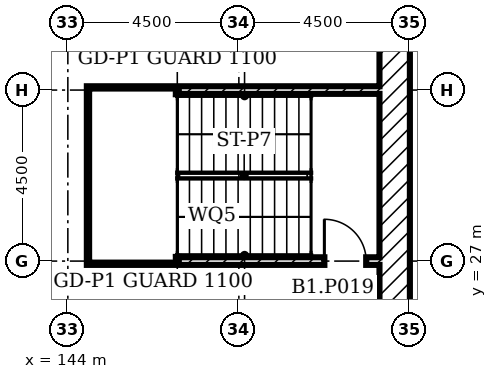
"""IFC4 building model, lengths in metres.
Left out: names, types, materials, properties, quantities, classifications, styles, units other than length and angle.
Written with IfcOpenShell. Run it as: python <this file> out.ifc"""

import sys

from ifc_helpers import new_model, si_unit, direction, frame, frame_2d, origin, place, context, subcontext, project, spatial, rectangle, extrude, element, fill, save


model = new_model("IFC4")
c1 = context("Model", 3, precision=1e-05, world=origin(), true_north=direction((0.0, 1.0)))
c2 = subcontext(c1, "Body", "Model", "MODEL_VIEW")
j1 = project(units=[si_unit("LENGTHUNIT", "METRE"), si_unit("PLANEANGLEUNIT", "RADIAN")], contexts=[c1])
p1 = place(None, origin())
s1 = spatial("IfcSite", under=j1, at=p1, CompositionType="ELEMENT")
p2 = place(p1, origin())
s2 = spatial("IfcBuilding", under=s1, at=p2, CompositionType="ELEMENT")
p3 = place(p2, frame((0.0, 0.0, -4.0)))
s3 = spatial("IfcBuildingStorey", under=s2, at=p3, CompositionType="ELEMENT", Elevation=-4.0)
p4 = place(p3, frame((152.6, 0.8, 0.0), z_axis=(0.0, 0.0, 1.0), x_axis=(0.0, 1.0, 0.0)))
e1 = element("IfcWall", 1, at=p4, inside=s3, PredefinedType="SOLIDWALL", context=c2, shape_type="SweptSolid", body=[
    extrude(rectangle(XDim=97.4, YDim=0.8, at=frame_2d((48.7, 0.0))), origin(), (0.0, 0.0, 1.0), 4.0),
])
p5 = place(p3, frame((144.6, 26.9, 0.0), z_axis=(0.0, 0.0, 1.0), x_axis=(0.0, 1.0, 0.0)))
e2 = element("IfcWall", 2, at=p5, inside=s3, PredefinedType="SOLIDWALL", context=c2, shape_type="SweptSolid", body=[
    extrude(rectangle(XDim=4.7, YDim=0.2, at=frame_2d((2.35, 0.0))), origin(), (0.0, 0.0, 1.0), 3.55),
])
p6 = place(p3, frame((144.7, 27.0, 0.0)))
e3 = element("IfcWall", 3, at=p6, inside=s3, PredefinedType="SOLIDWALL", context=c2, shape_type="SweptSolid", body=[
    extrude(rectangle(XDim=7.5, YDim=0.2, at=frame_2d((3.75, 0.0))), origin(), (0.0, 0.0, 1.0), 3.55),
])
p7 = place(p6, frame((6.05, 0.0, 0.0)))
e4 = element("IfcOpeningElement", 4, at=p7, cuts=e3, PredefinedType="OPENING", context=c2, shape_type="SweptSolid", body=[
    extrude(rectangle(XDim=1.1, YDim=2.1, at=frame_2d((0.55, 1.05))), frame((0.0, 0.11, 0.0), z_axis=(0.0, -1.0, 0.0), x_axis=(1.0, 0.0, 0.0)), (0.0, 0.0, 1.0), 0.22),
])
p8 = place(p3, frame((144.7, 31.5, 0.0)))
e5 = element("IfcWall", 5, at=p8, inside=s3, PredefinedType="SOLIDWALL", context=c2, shape_type="SweptSolid", body=[
    extrude(rectangle(XDim=7.5, YDim=0.2, at=frame_2d((3.75, 0.0))), origin(), (0.0, 0.0, 1.0), 3.55),
])
for number, where, z_axis, x_axis in (
    (6, (146.78, 27.1, -2.0), (0.0, 0.0, 1.0), (0.0, 1.0, 0.0)),
    (7, (145.3, 27.1, -2.0), (0.0, 0.0, 1.0), (0.0, 1.0, 0.0)),
):
    element("IfcWall", number, at=place(p3, frame(where, z_axis=z_axis, x_axis=x_axis)), inside=s3, PredefinedType="SOLIDWALL", context=c2, shape_type="SweptSolid", body=[
        extrude(rectangle(XDim=4.3, YDim=0.2, at=frame_2d((2.15, 0.0))), origin(), (0.0, 0.0, 1.0), 3.8),
    ])
p9 = place(p7, origin())
e8 = element("IfcDoor", 8, at=p9, inside=s3, OperationType="SINGLE_SWING_RIGHT", PredefinedType="DOOR", context=c2, shape_type="SweptSolid", body=[
    extrude(rectangle(XDim=1.1, YDim=2.1, at=frame_2d((0.55, 1.05))), frame((0.0, 0.025, 0.0), z_axis=(0.0, -1.0, 0.0), x_axis=(1.0, 0.0, 0.0)), (0.0, 0.0, 1.0), 0.05),
])
fill(e4, e8)
save(model, sys.argv[1])
